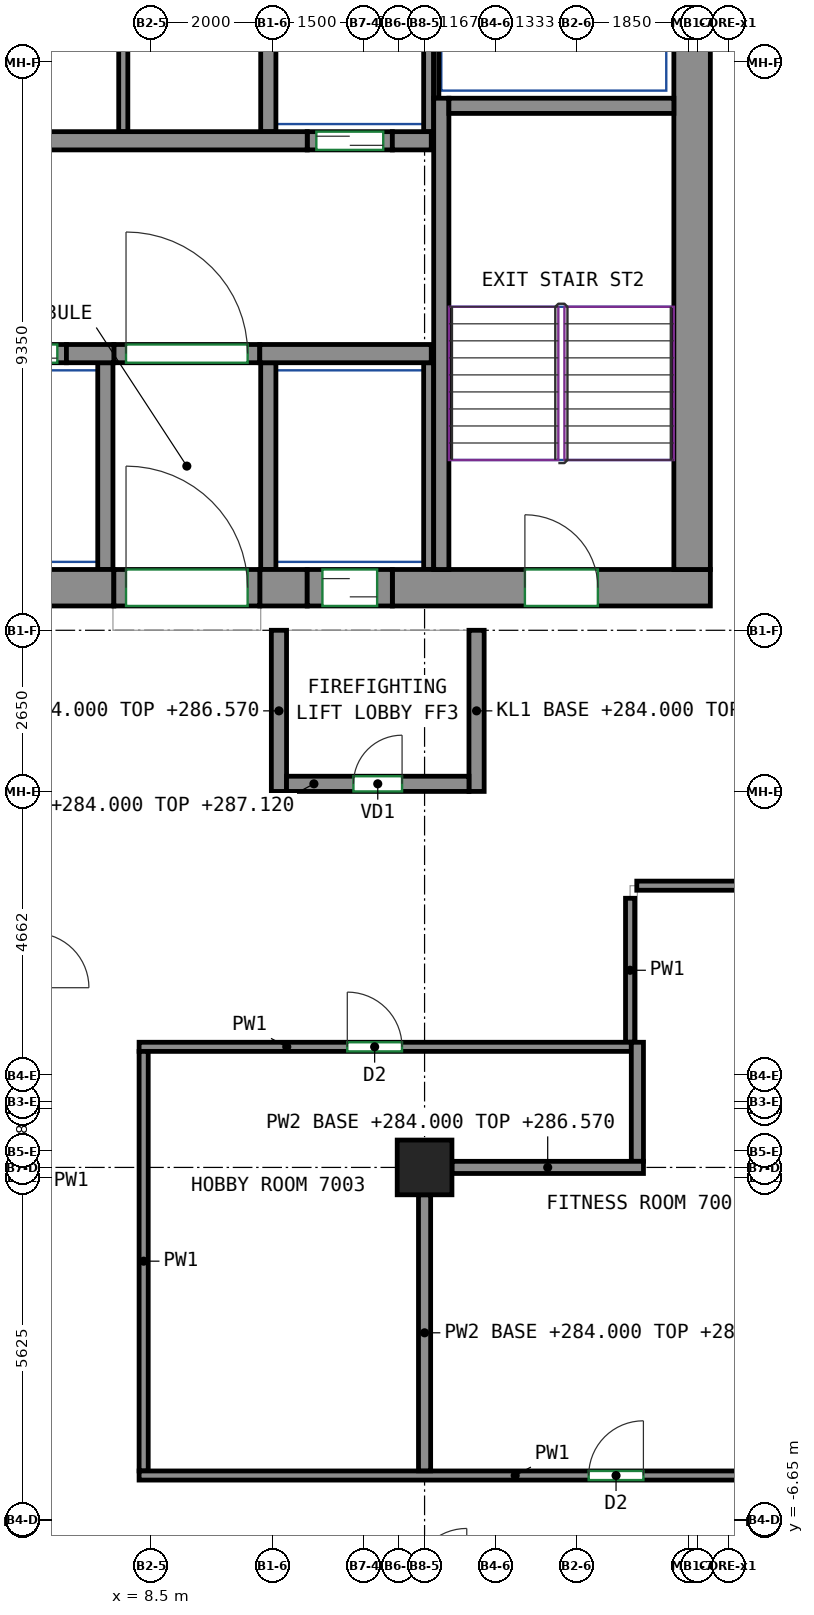
"""IFC4 building model, lengths in metres.
Left out: names, types, materials, properties, quantities, classifications, styles, units other than length and angle.
Written with IfcOpenShell. Run it as: python <this file> out.ifc"""

import sys

from ifc_helpers import new_model, si_unit, direction, frame, frame_2d, origin, origin_2d, place, context, subcontext, project, spatial, rectangle, extrude, source, transform, mapped, element, fill, save


model = new_model("IFC4")
c1 = context("Model", 3, precision=1e-05, world=origin(), true_north=direction((0.0, 1.0)))
c2 = subcontext(c1, "Body", "Model", "MODEL_VIEW")
j1 = project(units=[si_unit("LENGTHUNIT", "METRE"), si_unit("PLANEANGLEUNIT", "RADIAN")], contexts=[c1])
p1 = place(None, origin())
s1 = spatial("IfcSite", under=j1, at=p1, CompositionType="ELEMENT")
p2 = place(p1, origin())
s2 = spatial("IfcBuilding", under=s1, at=p2, CompositionType="ELEMENT")
p3 = place(p2, frame((0.0, 0.0, 284.0)))
s3 = spatial("IfcBuildingStorey", under=s2, at=p3, CompositionType="ELEMENT", Elevation=284.0)
m1 = source(origin(), c2, "Body", "SweptSolid", [
    extrude(rectangle(XDim=0.9, YDim=0.9, at=origin_2d()), origin(), (0.0, 0.0, 1.0), 3.12),
])
p4 = place(p3, frame((13.0, -0.833, 0.0), z_axis=(0.0, 0.0, 1.0), x_axis=(1.0, 0.0, 0.0)))
e1 = element("IfcColumn", 1, at=p4, inside=s3, PredefinedType="COLUMN", context=c2, shape_type="MappedRepresentation", body=[
    mapped(m1, transform((0.0, 0.0, 0.0))),
])
m2 = source(origin(), c2, "Body", "SweptSolid", [
    extrude(rectangle(XDim=14.18, YDim=0.6, at=frame_2d((7.09, 0.0))), origin(), (0.0, 0.0, 1.0), 3.12),
])
p5 = place(p3, frame((-6.29, 8.7, 0.0), z_axis=(0.0, 0.0, 1.0), x_axis=(1.0, 0.0, 0.0)))
e2 = element("IfcWall", 2, at=p5, inside=s3, PredefinedType="SHEAR", context=c2, shape_type="MappedRepresentation", body=[
    mapped(m2, transform((0.0, 0.0, 0.0))),
])
m3 = source(origin(), c2, "Body", "SweptSolid", [
    extrude(rectangle(XDim=0.78, YDim=0.6, at=frame_2d((0.39, 0.0))), origin(), (0.0, 0.0, 1.0), 3.12),
])
p6 = place(p3, frame((10.29, 8.7, 0.0), z_axis=(0.0, 0.0, 1.0), x_axis=(1.0, 0.0, 0.0)))
e3 = element("IfcWall", 3, at=p6, inside=s3, PredefinedType="SHEAR", context=c2, shape_type="MappedRepresentation", body=[
    mapped(m3, transform((0.0, 0.0, 0.0))),
])
m4 = source(origin(), c2, "Body", "SweptSolid", [
    extrude(rectangle(XDim=5.23, YDim=0.6, at=frame_2d((2.615, 0.0))), origin(), (0.0, 0.0, 1.0), 3.12),
])
p7 = place(p3, frame((12.47, 8.7, 0.0), z_axis=(0.0, 0.0, 1.0), x_axis=(1.0, 0.0, 0.0)))
e4 = element("IfcWall", 4, at=p7, inside=s3, PredefinedType="SHEAR", context=c2, shape_type="MappedRepresentation", body=[
    mapped(m4, transform((0.0, 0.0, 0.0))),
])
p8 = place(p7, frame((2.18, 0.0, 0.0)))
e5 = element("IfcOpeningElement", 5, at=p8, cuts=e4, PredefinedType="OPENING", context=c2, shape_type="SweptSolid", body=[
    extrude(rectangle(XDim=1.2, YDim=2.1, at=frame_2d((0.6, 1.05))), frame((0.0, 0.31, 0.0), z_axis=(0.0, -1.0, 0.0), x_axis=(1.0, 0.0, 0.0)), (0.0, 0.0, 1.0), 0.62),
])
m5 = source(origin(), c2, "Body", "SweptSolid", [
    extrude(rectangle(XDim=12.0, YDim=0.6, at=frame_2d((6.0, 0.0))), origin(), (0.0, 0.0, 1.0), 3.12),
])
p9 = place(p3, frame((17.4, 9.0, 0.0), z_axis=(0.0, 0.0, 1.0), x_axis=(0.0, 1.0, 0.0)))
e6 = element("IfcWall", 6, at=p9, inside=s3, PredefinedType="SHEAR", context=c2, shape_type="MappedRepresentation", body=[
    mapped(m5, transform((0.0, 0.0, 0.0))),
])
m6 = source(origin(), c2, "Body", "SweptSolid", [
    extrude(rectangle(XDim=7.75, YDim=0.25, at=frame_2d((3.875, 0.0))), origin(), (0.0, 0.0, 1.0), 3.12),
])
p10 = place(p3, frame((13.275, 9.0, 0.0), z_axis=(0.0, 0.0, 1.0), x_axis=(0.0, 1.0, 0.0)))
e7 = element("IfcWall", 7, at=p10, inside=s3, PredefinedType="SHEAR", context=c2, shape_type="MappedRepresentation", body=[
    mapped(m6, transform((0.0, 0.0, 0.0))),
])
m7 = source(origin(), c2, "Body", "SweptSolid", [
    extrude(rectangle(XDim=3.7, YDim=0.25, at=frame_2d((1.85, 0.0))), origin(), (0.0, 0.0, 1.0), 3.12),
])
p11 = place(p3, frame((13.4, 16.625, 0.0), z_axis=(0.0, 0.0, 1.0), x_axis=(1.0, 0.0, 0.0)))
e8 = element("IfcWall", 8, at=p11, inside=s3, PredefinedType="SHEAR", context=c2, shape_type="MappedRepresentation", body=[
    mapped(m7, transform((0.0, 0.0, 0.0))),
])
m8 = source(origin(), c2, "Body", "SweptSolid", [
    extrude(rectangle(XDim=0.78, YDim=0.3, at=frame_2d((0.39, 0.0))), origin(), (0.0, 0.0, 1.0), 3.12),
])
p12 = place(p3, frame((7.11, 12.55, 0.0), z_axis=(0.0, 0.0, 1.0), x_axis=(1.0, 0.0, 0.0)))
e9 = element("IfcWall", 9, at=p12, inside=s3, PredefinedType="SHEAR", context=c2, shape_type="MappedRepresentation", body=[
    mapped(m8, transform((0.0, 0.0, 0.0))),
])
m9 = source(origin(), c2, "Body", "SweptSolid", [
    extrude(rectangle(XDim=2.82, YDim=0.3, at=frame_2d((1.41, 0.0))), origin(), (0.0, 0.0, 1.0), 3.12),
])
p13 = place(p3, frame((10.29, 12.55, 0.0), z_axis=(0.0, 0.0, 1.0), x_axis=(1.0, 0.0, 0.0)))
e10 = element("IfcWall", 10, at=p13, inside=s3, PredefinedType="SHEAR", context=c2, shape_type="MappedRepresentation", body=[
    mapped(m9, transform((0.0, 0.0, 0.0))),
])
m10 = source(origin(), c2, "Body", "SweptSolid", [
    extrude(rectangle(XDim=22.08, YDim=0.3, at=frame_2d((11.04, 0.0))), origin(), (0.0, 0.0, 1.0), 3.12),
])
p14 = place(p3, frame((-11.01, 16.05, 0.0), z_axis=(0.0, 0.0, 1.0), x_axis=(1.0, 0.0, 0.0)))
e11 = element("IfcWall", 11, at=p14, inside=s3, PredefinedType="SHEAR", context=c2, shape_type="MappedRepresentation", body=[
    mapped(m10, transform((0.0, 0.0, 0.0))),
])
m11 = source(origin(), c2, "Body", "SweptSolid", [
    extrude(rectangle(XDim=0.64, YDim=0.3, at=frame_2d((0.32, 0.0))), origin(), (0.0, 0.0, 1.0), 3.12),
])
p15 = place(p3, frame((12.47, 16.05, 0.0), z_axis=(0.0, 0.0, 1.0), x_axis=(1.0, 0.0, 0.0)))
e12 = element("IfcWall", 12, at=p15, inside=s3, PredefinedType="SHEAR", context=c2, shape_type="MappedRepresentation", body=[
    mapped(m11, transform((0.0, 0.0, 0.0))),
])
m12 = source(origin(), c2, "Body", "SweptSolid", [
    extrude(rectangle(XDim=1.4, YDim=0.3, at=frame_2d((0.7, 0.0))), origin(), (0.0, 0.0, 1.0), 3.12),
])
p16 = place(p3, frame((5.71, 12.55, 0.0), z_axis=(0.0, 0.0, 1.0), x_axis=(1.0, 0.0, 0.0)))
e13 = element("IfcWall", 13, at=p16, inside=s3, PredefinedType="PARTITIONING", context=c2, shape_type="MappedRepresentation", body=[
    mapped(m12, transform((0.0, 0.0, 0.0))),
])
p17 = place(p16, frame((0.15, 0.0, 0.0)))
e14 = element("IfcOpeningElement", 14, at=p17, cuts=e13, PredefinedType="OPENING", context=c2, shape_type="SweptSolid", body=[
    extrude(rectangle(XDim=1.1, YDim=2.1, at=frame_2d((0.55, 1.05))), frame((0.0, 0.16, 0.0), z_axis=(0.0, -1.0, 0.0), x_axis=(1.0, 0.0, 0.0)), (0.0, 0.0, 1.0), 0.32),
])
m13 = source(origin(), c2, "Body", "SweptSolid", [
    extrude(rectangle(XDim=1.4, YDim=0.3, at=frame_2d((0.7, 0.0))), origin(), (0.0, 0.0, 1.0), 3.12),
])
p18 = place(p3, frame((11.07, 16.05, 0.0), z_axis=(0.0, 0.0, 1.0), x_axis=(1.0, 0.0, 0.0)))
e15 = element("IfcWall", 15, at=p18, inside=s3, PredefinedType="PARTITIONING", context=c2, shape_type="MappedRepresentation", body=[
    mapped(m13, transform((0.0, 0.0, 0.0))),
])
p19 = place(p18, frame((0.15, 0.0, 0.0)))
e16 = element("IfcOpeningElement", 16, at=p19, cuts=e15, PredefinedType="OPENING", context=c2, shape_type="SweptSolid", body=[
    extrude(rectangle(XDim=1.1, YDim=2.1, at=frame_2d((0.55, 1.05))), frame((0.0, 0.16, 0.0), z_axis=(0.0, -1.0, 0.0), x_axis=(1.0, 0.0, 0.0)), (0.0, 0.0, 1.0), 0.32),
])
m14 = source(origin(), c2, "Body", "SweptSolid", [
    extrude(rectangle(XDim=2.4, YDim=0.3, at=frame_2d((1.2, 0.0))), origin(), (0.0, 0.0, 1.0), 3.12),
])
p20 = place(p3, frame((7.89, 12.55, 0.0), z_axis=(0.0, 0.0, 1.0), x_axis=(1.0, 0.0, 0.0)))
e17 = element("IfcWall", 17, at=p20, inside=s3, PredefinedType="PARTITIONING", context=c2, shape_type="MappedRepresentation", body=[
    mapped(m14, transform((0.0, 0.0, 0.0))),
])
p21 = place(p20, frame((0.2, 0.0, 0.0)))
e18 = element("IfcOpeningElement", 18, at=p21, cuts=e17, PredefinedType="OPENING", context=c2, shape_type="SweptSolid", body=[
    extrude(rectangle(XDim=2.0, YDim=2.1, at=frame_2d((1.0, 1.05))), frame((0.0, 0.16, 0.0), z_axis=(0.0, -1.0, 0.0), x_axis=(1.0, 0.0, 0.0)), (0.0, 0.0, 1.0), 0.32),
])
m15 = source(origin(), c2, "Body", "SweptSolid", [
    extrude(rectangle(XDim=2.65, YDim=0.25, at=frame_2d((1.325, 0.0))), origin(), (0.0, 0.0, 1.0), 2.57),
])
for number, where, z_axis, x_axis in (
    (19, (10.605, 5.35, 0.0), (0.0, 0.0, 1.0), (0.0, 1.0, 0.0)),
    (20, (13.855, 5.35, 0.0), (0.0, 0.0, 1.0), (0.0, 1.0, 0.0)),
):
    element("IfcWall", number, at=place(p3, frame(where, z_axis=z_axis, x_axis=x_axis)), inside=s3, PredefinedType="PARTITIONING", context=c2, shape_type="MappedRepresentation", body=[
        mapped(m15, transform((0.0, 0.0, 0.0))),
    ])
m16 = source(origin(), c2, "Body", "SweptSolid", [
    extrude(rectangle(XDim=3.0, YDim=0.25, at=frame_2d((1.5, 0.0))), origin(), (0.0, 0.0, 1.0), 3.12),
])
p22 = place(p3, frame((10.73, 5.475, 0.0), z_axis=(0.0, 0.0, 1.0), x_axis=(1.0, 0.0, 0.0)))
e21 = element("IfcWall", 21, at=p22, inside=s3, PredefinedType="PARTITIONING", context=c2, shape_type="MappedRepresentation", body=[
    mapped(m16, transform((0.0, 0.0, 0.0))),
])
p23 = place(p22, frame((1.1, 0.0, 0.0)))
e22 = element("IfcOpeningElement", 22, at=p23, cuts=e21, PredefinedType="OPENING", context=c2, shape_type="SweptSolid", body=[
    extrude(rectangle(XDim=0.8, YDim=2.0, at=frame_2d((0.4, 1.0))), frame((0.0, 0.135, 0.0), z_axis=(0.0, -1.0, 0.0), x_axis=(1.0, 0.0, 0.0)), (0.0, 0.0, 1.0), 0.27),
])
m17 = source(origin(), c2, "Body", "SweptSolid", [
    extrude(rectangle(XDim=3.275, YDim=0.165, at=frame_2d((1.638, 0.0))), origin(), (0.0, 0.0, 1.0), 3.12),
])
p24 = place(p3, frame((13.067, 16.2, 0.0), z_axis=(0.0, 0.0, 1.0), x_axis=(0.0, 1.0, 0.0)))
e23 = element("IfcWall", 23, at=p24, inside=s3, PredefinedType="PARTITIONING", context=c2, shape_type="MappedRepresentation", body=[
    mapped(m17, transform((0.0, 0.0, 0.0))),
])
m18 = source(origin(), c2, "Body", "SweptSolid", [
    extrude(rectangle(XDim=3.275, YDim=0.25, at=frame_2d((1.638, 0.0))), origin(), (0.0, 0.0, 1.0), 3.12),
])
p25 = place(p3, frame((10.43, 16.2, 0.0), z_axis=(0.0, 0.0, 1.0), x_axis=(0.0, 1.0, 0.0)))
e24 = element("IfcWall", 24, at=p25, inside=s3, PredefinedType="PARTITIONING", context=c2, shape_type="MappedRepresentation", body=[
    mapped(m18, transform((0.0, 0.0, 0.0))),
])
m19 = source(origin(), c2, "Body", "SweptSolid", [
    extrude(rectangle(XDim=2.725, YDim=0.085, at=frame_2d((1.363, 0.0))), origin(), (0.0, 0.0, 1.0), 3.12),
])
p26 = place(p3, frame((13.192, 16.75, 0.0), z_axis=(0.0, 0.0, 1.0), x_axis=(0.0, 1.0, 0.0)))
e25 = element("IfcWall", 25, at=p26, inside=s3, PredefinedType="PARTITIONING", context=c2, shape_type="MappedRepresentation", body=[
    mapped(m19, transform((0.0, 0.0, 0.0))),
])
m20 = source(origin(), c2, "Body", "SweptSolid", [
    extrude(rectangle(XDim=3.4, YDim=0.25, at=frame_2d((1.7, 0.0))), origin(), (0.0, 0.0, 1.0), 3.12),
])
p27 = place(p3, frame((10.43, 9.0, 0.0), z_axis=(0.0, 0.0, 1.0), x_axis=(0.0, 1.0, 0.0)))
e26 = element("IfcWall", 26, at=p27, inside=s3, PredefinedType="PARTITIONING", context=c2, shape_type="MappedRepresentation", body=[
    mapped(m20, transform((0.0, 0.0, 0.0))),
])
m21 = source(origin(), c2, "Body", "SweptSolid", [
    extrude(rectangle(XDim=3.4, YDim=0.165, at=frame_2d((1.7, 0.0))), origin(), (0.0, 0.0, 1.0), 3.12),
])
p28 = place(p3, frame((13.067, 9.0, 0.0), z_axis=(0.0, 0.0, 1.0), x_axis=(0.0, 1.0, 0.0)))
e27 = element("IfcWall", 27, at=p28, inside=s3, PredefinedType="PARTITIONING", context=c2, shape_type="MappedRepresentation", body=[
    mapped(m21, transform((0.0, 0.0, 0.0))),
])
p29 = place(p3, frame((7.75, 9.0, 0.0), z_axis=(0.0, 0.0, 1.0), x_axis=(0.0, 1.0, 0.0)))
e28 = element("IfcWall", 28, at=p29, inside=s3, PredefinedType="PARTITIONING", context=c2, shape_type="MappedRepresentation", body=[
    mapped(m20, transform((0.0, 0.0, 0.0))),
])
m22 = source(origin(), c2, "Body", "SweptSolid", [
    extrude(rectangle(XDim=4.8, YDim=0.15, at=frame_2d((2.4, 0.0))), origin(), (0.0, 0.0, 1.0), 3.12),
])
p30 = place(p3, frame((8.045, 16.2, 0.0), z_axis=(0.0, 0.0, 1.0), x_axis=(0.0, 1.0, 0.0)))
e29 = element("IfcWall", 29, at=p30, inside=s3, PredefinedType="PARTITIONING", context=c2, shape_type="MappedRepresentation", body=[
    mapped(m22, transform((0.0, 0.0, 0.0))),
])
m23 = source(origin(), c2, "Body", "SweptSolid", [
    extrude(rectangle(XDim=2.4, YDim=0.6, at=frame_2d((1.2, 0.0))), origin(), (0.0, 0.0, 1.0), 2.7),
])
p31 = place(p3, frame((7.89, 8.7, 0.0), z_axis=(0.0, 0.0, 1.0), x_axis=(1.0, 0.0, 0.0)))
e30 = element("IfcWall", 30, at=p31, inside=s3, PredefinedType="PARTITIONING", context=c2, shape_type="MappedRepresentation", body=[
    mapped(m23, transform((0.0, 0.0, 0.0))),
])
p32 = place(p31, frame((0.2, 0.0, 0.0)))
e31 = element("IfcOpeningElement", 31, at=p32, cuts=e30, PredefinedType="OPENING", context=c2, shape_type="SweptSolid", body=[
    extrude(rectangle(XDim=2.0, YDim=2.1, at=frame_2d((1.0, 1.05))), frame((0.0, 0.31, 0.0), z_axis=(0.0, -1.0, 0.0), x_axis=(1.0, 0.0, 0.0)), (0.0, 0.0, 1.0), 0.62),
])
m24 = source(origin(), c2, "Body", "SweptSolid", [
    extrude(rectangle(XDim=1.4, YDim=0.6, at=frame_2d((0.7, 0.0))), origin(), (0.0, 0.0, 1.0), 2.7),
])
p33 = place(p3, frame((11.07, 8.7, 0.0), z_axis=(0.0, 0.0, 1.0), x_axis=(1.0, 0.0, 0.0)))
e32 = element("IfcWall", 32, at=p33, inside=s3, PredefinedType="PARTITIONING", context=c2, shape_type="MappedRepresentation", body=[
    mapped(m24, transform((0.0, 0.0, 0.0))),
])
p34 = place(p33, frame((0.25, 0.0, 0.0)))
e33 = element("IfcOpeningElement", 33, at=p34, cuts=e32, PredefinedType="OPENING", context=c2, shape_type="SweptSolid", body=[
    extrude(rectangle(XDim=0.9, YDim=2.1, at=frame_2d((0.45, 1.05))), frame((0.0, 0.31, 0.0), z_axis=(0.0, -1.0, 0.0), x_axis=(1.0, 0.0, 0.0)), (0.0, 0.0, 1.0), 0.62),
])
p35 = place(p3, frame((16.38, 1.225, 0.0), z_axis=(0.0, 0.0, 1.0), x_axis=(0.0, 1.0, 0.0)))
e34 = element("IfcWall", 34, at=p35, inside=s3, PredefinedType="PARTITIONING", context=c2, shape_type="SweptSolid", body=[
    extrude(rectangle(XDim=2.368, YDim=0.15, at=frame_2d((1.184, 0.0))), origin(), (0.0, 0.0, 1.0), 3.12),
])
p36 = place(p3, frame((8.305, 1.15, 0.0), z_axis=(0.0, 0.0, 1.0), x_axis=(1.0, 0.0, 0.0)))
e35 = element("IfcWall", 35, at=p36, inside=s3, PredefinedType="PARTITIONING", context=c2, shape_type="SweptSolid", body=[
    extrude(rectangle(XDim=8.095, YDim=0.15, at=frame_2d((4.047, 0.0))), origin(), (0.0, 0.0, 1.0), 3.12),
])
p37 = place(p36, frame((3.424, 0.0, 0.0)))
e36 = element("IfcOpeningElement", 36, at=p37, cuts=e35, PredefinedType="OPENING", context=c2, shape_type="SweptSolid", body=[
    extrude(rectangle(XDim=0.9, YDim=2.1, at=frame_2d((0.45, 1.05))), frame((0.0, 0.085, 0.0), z_axis=(0.0, -1.0, 0.0), x_axis=(1.0, 0.0, 0.0)), (0.0, 0.0, 1.0), 0.17),
])
p38 = place(p3, frame((8.38, -5.825, 0.0), z_axis=(0.0, 0.0, 1.0), x_axis=(0.0, 1.0, 0.0)))
e37 = element("IfcWall", 37, at=p38, inside=s3, PredefinedType="PARTITIONING", context=c2, shape_type="SweptSolid", body=[
    extrude(rectangle(XDim=6.9, YDim=0.15, at=frame_2d((3.45, 0.0))), origin(), (0.0, 0.0, 1.0), 3.12),
])
p39 = place(p3, frame((8.305, -5.9, 0.0), z_axis=(0.0, 0.0, 1.0), x_axis=(1.0, 0.0, 0.0)))
e38 = element("IfcWall", 38, at=p39, inside=s3, PredefinedType="PARTITIONING", context=c2, shape_type="SweptSolid", body=[
    extrude(rectangle(XDim=12.37, YDim=0.15, at=frame_2d((6.185, 0.0))), origin(), (0.0, 0.0, 1.0), 3.12),
])
p40 = place(p39, frame((7.394, 0.0, 0.0)))
e39 = element("IfcOpeningElement", 39, at=p40, cuts=e38, PredefinedType="OPENING", context=c2, shape_type="SweptSolid", body=[
    extrude(rectangle(XDim=0.9, YDim=2.1, at=frame_2d((0.45, 1.05))), frame((0.0, 0.085, 0.0), z_axis=(0.0, -1.0, 0.0), x_axis=(1.0, 0.0, 0.0)), (0.0, 0.0, 1.0), 0.17),
])
p41 = place(p3, frame((16.49, 3.8, 0.0), z_axis=(0.0, 0.0, 1.0), x_axis=(1.0, 0.0, 0.0)))
e40 = element("IfcWall", 40, at=p41, inside=s3, PredefinedType="PARTITIONING", context=c2, shape_type="SweptSolid", body=[
    extrude(rectangle(XDim=4.085, YDim=0.15, at=frame_2d((2.042, 0.0))), origin(), (0.0, 0.0, 1.0), 3.12),
])
p42 = place(p3, frame((16.5, -0.733, 0.0), z_axis=(0.0, 0.0, 1.0), x_axis=(0.0, 1.0, 0.0)))
e41 = element("IfcWall", 41, at=p42, inside=s3, PredefinedType="PARTITIONING", context=c2, shape_type="SweptSolid", body=[
    extrude(rectangle(XDim=1.958, YDim=0.2, at=frame_2d((0.979, 0.0))), origin(), (0.0, 0.0, 1.0), 3.12),
])
p43 = place(p3, frame((13.45, -0.833, 0.0), z_axis=(0.0, 0.0, 1.0), x_axis=(1.0, 0.0, 0.0)))
e42 = element("IfcWall", 42, at=p43, inside=s3, PredefinedType="PARTITIONING", context=c2, shape_type="SweptSolid", body=[
    extrude(rectangle(XDim=3.15, YDim=0.2, at=frame_2d((1.575, 0.0))), origin(), (0.0, 0.0, 1.0), 2.57),
])
p44 = place(p3, frame((13.0, -5.823, 0.0), z_axis=(0.0, 0.0, 1.0), x_axis=(0.0, 1.0, 0.0)))
e43 = element("IfcWall", 43, at=p44, inside=s3, PredefinedType="PARTITIONING", context=c2, shape_type="SweptSolid", body=[
    extrude(rectangle(XDim=4.54, YDim=0.2, at=frame_2d((2.27, 0.0))), origin(), (0.0, 0.0, 1.0), 2.57),
])
p45 = place(p21, origin())
e44 = element("IfcDoor", 44, at=p45, inside=s3, OperationType="DOUBLE_DOOR_SINGLE_SWING", PredefinedType="DOOR", context=c2, shape_type="SweptSolid", body=[
    extrude(rectangle(XDim=2.0, YDim=2.1, at=frame_2d((1.0, 1.05))), frame((0.0, 0.025, 0.0), z_axis=(0.0, -1.0, 0.0), x_axis=(1.0, 0.0, 0.0)), (0.0, 0.0, 1.0), 0.05),
])
fill(e18, e44)
p46 = place(p32, origin())
e45 = element("IfcDoor", 45, at=p46, inside=s3, OperationType="DOUBLE_DOOR_SINGLE_SWING", PredefinedType="DOOR", context=c2, shape_type="SweptSolid", body=[
    extrude(rectangle(XDim=2.0, YDim=2.1, at=frame_2d((1.0, 1.05))), frame((0.0, 0.205, 0.0), z_axis=(0.0, -1.0, 0.0), x_axis=(1.0, 0.0, 0.0)), (0.0, 0.0, 1.0), 0.05),
])
fill(e31, e45)
p47 = place(p23, origin())
e46 = element("IfcDoor", 46, at=p47, inside=s3, OperationType="SINGLE_SWING_RIGHT", PredefinedType="DOOR", context=c2, shape_type="SweptSolid", body=[
    extrude(rectangle(XDim=0.8, YDim=2.0, at=frame_2d((0.4, 1.0))), frame((0.0, 0.025, 0.0), z_axis=(0.0, -1.0, 0.0), x_axis=(1.0, 0.0, 0.0)), (0.0, 0.0, 1.0), 0.05),
])
fill(e22, e46)
p48 = place(p34, origin())
e47 = element("IfcDoor", 47, at=p48, inside=s3, OperationType="SLIDING_TO_LEFT", PredefinedType="DOOR", context=c2, shape_type="SweptSolid", body=[
    extrude(rectangle(XDim=0.9, YDim=2.1, at=frame_2d((0.45, 1.05))), frame((0.0, 0.205, 0.0), z_axis=(0.0, -1.0, 0.0), x_axis=(1.0, 0.0, 0.0)), (0.0, 0.0, 1.0), 0.05),
])
fill(e33, e47)
p49 = place(p17, origin())
e48 = element("IfcDoor", 48, at=p49, inside=s3, OperationType="DOUBLE_DOOR_SLIDING", PredefinedType="DOOR", context=c2, shape_type="SweptSolid", body=[
    extrude(rectangle(XDim=1.1, YDim=2.1, at=frame_2d((0.55, 1.05))), frame((0.0, 0.025, 0.0), z_axis=(0.0, -1.0, 0.0), x_axis=(1.0, 0.0, 0.0)), (0.0, 0.0, 1.0), 0.05),
])
fill(e14, e48)
p50 = place(p19, origin())
e49 = element("IfcDoor", 49, at=p50, inside=s3, OperationType="DOUBLE_DOOR_SLIDING", PredefinedType="DOOR", context=c2, shape_type="SweptSolid", body=[
    extrude(rectangle(XDim=1.1, YDim=2.1, at=frame_2d((0.55, 1.05))), frame((0.0, 0.025, 0.0), z_axis=(0.0, -1.0, 0.0), x_axis=(1.0, 0.0, 0.0)), (0.0, 0.0, 1.0), 0.05),
])
fill(e16, e49)
p51 = place(p8, origin())
e50 = element("IfcDoor", 50, at=p51, inside=s3, OperationType="DOUBLE_DOOR_SINGLE_SWING", PredefinedType="DOOR", context=c2, shape_type="SweptSolid", body=[
    extrude(rectangle(XDim=1.2, YDim=2.1, at=frame_2d((0.6, 1.05))), frame((0.0, 0.205, 0.0), z_axis=(0.0, -1.0, 0.0), x_axis=(1.0, 0.0, 0.0)), (0.0, 0.0, 1.0), 0.05),
])
fill(e5, e50)
p52 = place(p40, origin())
e51 = element("IfcDoor", 51, at=p52, inside=s3, OperationType="SINGLE_SWING_RIGHT", PredefinedType="DOOR", context=c2, shape_type="SweptSolid", body=[
    extrude(rectangle(XDim=0.9, YDim=2.1, at=frame_2d((0.45, 1.05))), frame((0.0, 0.025, 0.0), z_axis=(0.0, -1.0, 0.0), x_axis=(1.0, 0.0, 0.0)), (0.0, 0.0, 1.0), 0.05),
])
fill(e39, e51)
p53 = place(p37, origin())
e52 = element("IfcDoor", 52, at=p53, inside=s3, OperationType="SINGLE_SWING_LEFT", PredefinedType="DOOR", context=c2, shape_type="SweptSolid", body=[
    extrude(rectangle(XDim=0.9, YDim=2.1, at=frame_2d((0.45, 1.05))), frame((0.0, 0.025, 0.0), z_axis=(0.0, -1.0, 0.0), x_axis=(1.0, 0.0, 0.0)), (0.0, 0.0, 1.0), 0.05),
])
fill(e36, e52)
save(model, sys.argv[1])
